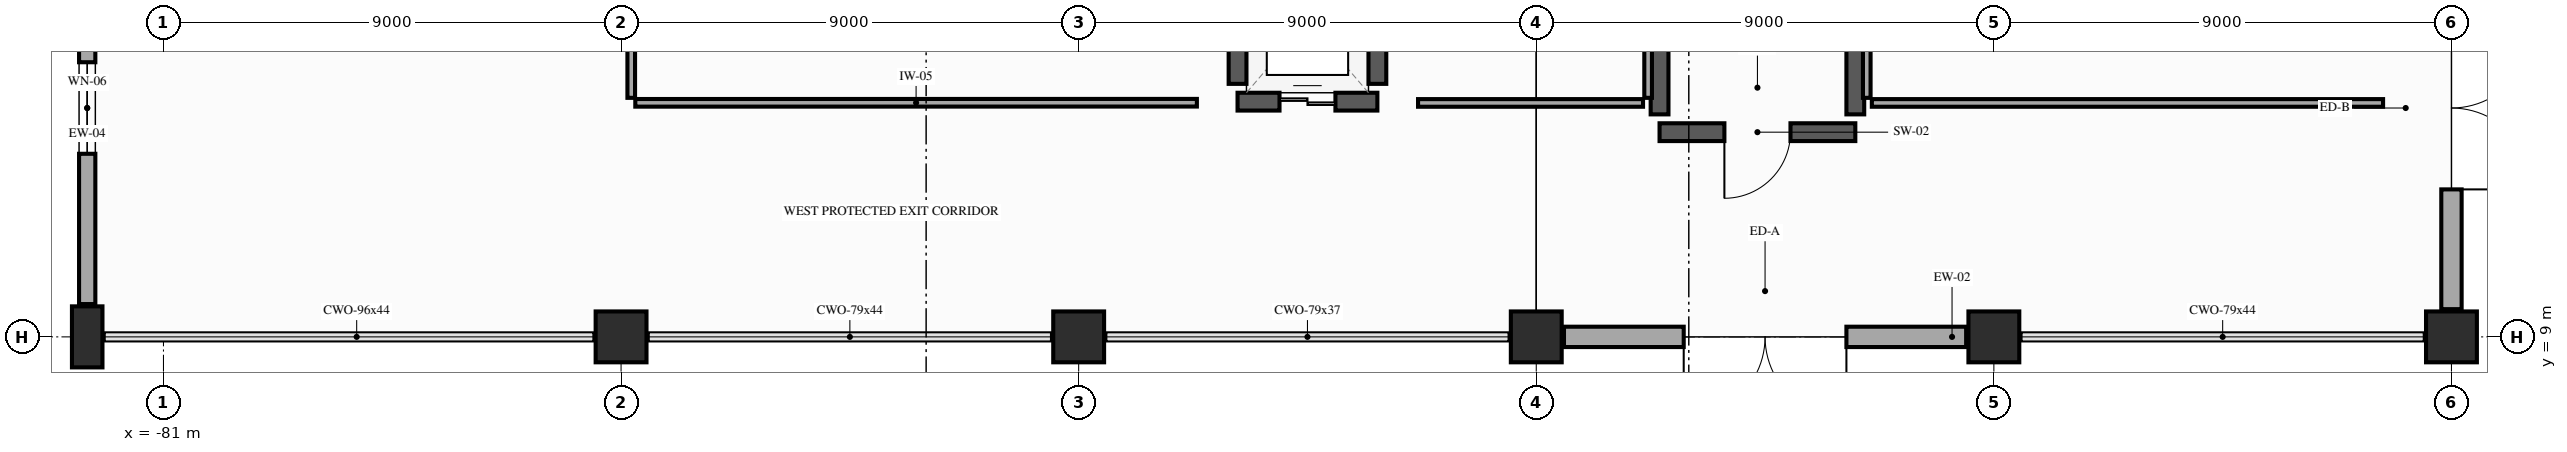
"""IFC4 building model, lengths in metres.
Left out: names, types, materials, properties, quantities, classifications, styles, units other than length and angle.
Written with IfcOpenShell. Run it as: python <this file> out.ifc"""

import sys

from ifc_helpers import new_model, si_unit, direction, frame, frame_2d, origin, origin_2d, place, context, subcontext, project, spatial, rectangle, extrude, element, fill, save


model = new_model("IFC4")
c1 = context("Model", 3, precision=1e-05, world=origin(), true_north=direction((0.0, 1.0)))
c2 = subcontext(c1, "Body", "Model", "MODEL_VIEW")
j1 = project(units=[si_unit("LENGTHUNIT", "METRE"), si_unit("PLANEANGLEUNIT", "RADIAN")], contexts=[c1])
p1 = place(None, origin())
s1 = spatial("IfcSite", under=j1, at=p1, CompositionType="ELEMENT")
p2 = place(p1, origin())
s2 = spatial("IfcBuilding", under=s1, at=p2, CompositionType="ELEMENT")
p3 = place(p2, origin())
s3 = spatial("IfcBuildingStorey", under=s2, at=p3, CompositionType="ELEMENT", Elevation=0.0)
p4 = place(p3, frame((-82.5, 9.0, 0.0), z_axis=(0.0, 0.0, 1.0), x_axis=(1.0, 0.0, 0.0)))
e1 = element("IfcColumn", 1, at=p4, inside=s3, PredefinedType="PILASTER", context=c2, shape_type="SweptSolid", body=[
    extrude(rectangle(XDim=0.6, YDim=1.2, at=origin_2d()), origin(), (0.0, 0.0, 1.0), 5.4),
])
for number, where, z_axis, x_axis in (
    (2, (-72.0, 9.0, 0.0), (0.0, 0.0, 1.0), (1.0, 0.0, 0.0)),
    (3, (-63.0, 9.0, 0.0), (0.0, 0.0, 1.0), (1.0, 0.0, 0.0)),
    (4, (-54.0, 9.0, 0.0), (0.0, 0.0, 1.0), (1.0, 0.0, 0.0)),
    (5, (-45.0, 9.0, 0.0), (0.0, 0.0, 1.0), (1.0, 0.0, 0.0)),
    (6, (-36.0, 9.0, 0.0), (0.0, 0.0, 1.0), (1.0, 0.0, 0.0)),
):
    element("IfcColumn", number, at=place(p3, frame(where, z_axis=z_axis, x_axis=x_axis)), inside=s3, PredefinedType="COLUMN", context=c2, shape_type="SweptSolid", body=[
        extrude(rectangle(XDim=1.0, YDim=1.0, at=origin_2d()), origin(), (0.0, 0.0, 1.0), 5.4),
    ])
p5 = place(p3, frame((-36.0, 17.455, 0.0), z_axis=(0.0, 0.0, 1.0), x_axis=(0.0, -1.0, 0.0)))
e7 = element("IfcWall", 7, at=p5, inside=s3, PredefinedType="SOLIDWALL", context=c2, shape_type="SweptSolid", body=[
    extrude(rectangle(XDim=7.91, YDim=0.4, at=frame_2d((3.955, 0.0))), origin(), (0.0, 0.0, 1.0), 4.405),
])
p6 = place(p5, frame((2.355, 0.0, 0.0)))
e8 = element("IfcOpeningElement", 8, at=p6, cuts=e7, PredefinedType="OPENING", context=c2, shape_type="SweptSolid", body=[
    extrude(rectangle(XDim=3.2, YDim=2.8, at=frame_2d((1.6, 1.4))), frame((0.0, 0.21, 0.0), z_axis=(0.0, -1.0, 0.0), x_axis=(1.0, 0.0, 0.0)), (0.0, 0.0, 1.0), 0.42),
])
p7 = place(p3, frame((-45.545, 9.0, 0.0), z_axis=(0.0, 0.0, 1.0), x_axis=(-1.0, 0.0, 0.0)))
e9 = element("IfcWall", 9, at=p7, inside=s3, PredefinedType="SOLIDWALL", context=c2, shape_type="SweptSolid", body=[
    extrude(rectangle(XDim=7.91, YDim=0.4, at=frame_2d((3.955, 0.0))), origin(), (0.0, 0.0, 1.0), 3.755),
])
p8 = place(p7, frame((2.355, 0.0, 0.0)))
e10 = element("IfcOpeningElement", 10, at=p8, cuts=e9, PredefinedType="OPENING", context=c2, shape_type="SweptSolid", body=[
    extrude(rectangle(XDim=3.2, YDim=3.0, at=frame_2d((1.6, 1.5))), frame((0.0, 0.21, 0.0), z_axis=(0.0, -1.0, 0.0), x_axis=(1.0, 0.0, 0.0)), (0.0, 0.0, 1.0), 0.42),
])
p9 = place(p3, frame((-82.5, 9.645, 0.0), z_axis=(0.0, 0.0, 1.0), x_axis=(0.0, 1.0, 0.0)))
e11 = element("IfcWall", 11, at=p9, inside=s3, PredefinedType="SOLIDWALL", context=c2, shape_type="SweptSolid", body=[
    extrude(rectangle(XDim=7.71, YDim=0.32, at=frame_2d((3.855, 0.0))), origin(), (0.0, 0.0, 1.0), 4.405),
])
p10 = place(p9, frame((2.955, 0.0, 0.9)))
e12 = element("IfcOpeningElement", 12, at=p10, cuts=e11, PredefinedType="OPENING", context=c2, shape_type="SweptSolid", body=[
    extrude(rectangle(XDim=1.8, YDim=2.2, at=frame_2d((0.9, 1.1))), frame((0.0, 0.17, 0.0), z_axis=(0.0, -1.0, 0.0), x_axis=(1.0, 0.0, 0.0)), (0.0, 0.0, 1.0), 0.34),
])
p11 = place(p3, frame((-47.725, 13.025, 0.0), z_axis=(0.0, 0.0, 1.0), x_axis=(-1.0, 0.0, 0.0)))
e13 = element("IfcWall", 13, at=p11, inside=s3, PredefinedType="SHEAR", context=c2, shape_type="SweptSolid", body=[
    extrude(rectangle(XDim=3.85, YDim=0.35, at=frame_2d((1.925, 0.0))), origin(), (0.0, 0.0, 1.0), 5.12),
])
p12 = place(p11, frame((1.275, 0.0, 0.0)))
e14 = element("IfcOpeningElement", 14, at=p12, cuts=e13, PredefinedType="OPENING", context=c2, shape_type="SweptSolid", body=[
    extrude(rectangle(XDim=1.3, YDim=2.2, at=frame_2d((0.65, 1.1))), frame((0.0, 0.185, 0.0), z_axis=(0.0, -1.0, 0.0), x_axis=(1.0, 0.0, 0.0)), (0.0, 0.0, 1.0), 0.37),
])
for number, where, z_axis, x_axis in (
    (15, (-51.575, 13.375, 0.0), (0.0, 0.0, 1.0), (0.0, 1.0, 0.0)),
    (16, (-47.725, 13.375, 0.0), (0.0, 0.0, 1.0), (0.0, 1.0, 0.0)),
):
    element("IfcWall", number, at=place(p3, frame(where, z_axis=z_axis, x_axis=x_axis)), inside=s3, PredefinedType="SHEAR", context=c2, shape_type="SweptSolid", body=[
        extrude(rectangle(XDim=9.1, YDim=0.35, at=frame_2d((4.55, 0.0))), origin(), (0.0, 0.0, 1.0), 5.12),
    ])
p13 = place(p3, frame((-59.875, 13.625, 0.0), z_axis=(0.0, 0.0, 1.0), x_axis=(1.0, 0.0, 0.0)))
e17 = element("IfcWall", 17, at=p13, inside=s3, PredefinedType="SHEAR", context=c2, shape_type="SweptSolid", body=[
    extrude(rectangle(XDim=2.75, YDim=0.35, at=frame_2d((1.375, 0.0))), origin(), (0.0, 0.0, 1.0), 5.12),
])
p14 = place(p13, frame((0.825, 0.0, 0.0)))
e18 = element("IfcOpeningElement", 18, at=p14, cuts=e17, PredefinedType="OPENING", context=c2, shape_type="SweptSolid", body=[
    extrude(rectangle(XDim=1.1, YDim=2.2, at=frame_2d((0.55, 1.1))), frame((0.0, 0.185, 0.0), z_axis=(0.0, -1.0, 0.0), x_axis=(1.0, 0.0, 0.0)), (0.0, 0.0, 1.0), 0.37),
])
for number, where, z_axis, x_axis in (
    (19, (-59.875, 13.975, 0.0), (0.0, 0.0, 1.0), (0.0, 1.0, 0.0)),
    (20, (-57.125, 13.975, 0.0), (0.0, 0.0, 1.0), (0.0, 1.0, 0.0)),
):
    element("IfcWall", number, at=place(p3, frame(where, z_axis=z_axis, x_axis=x_axis)), inside=s3, PredefinedType="SHEAR", context=c2, shape_type="SweptSolid", body=[
        extrude(rectangle(XDim=2.45, YDim=0.35, at=frame_2d((1.225, 0.0))), origin(), (0.0, 0.0, 1.0), 5.12),
    ])
p15 = place(p3, frame((-71.8, 17.36, 0.0), z_axis=(0.0, 0.0, 1.0), x_axis=(0.0, -1.0, 0.0)))
e21 = element("IfcWall", 21, at=p15, inside=s3, PredefinedType="PARTITIONING", context=c2, shape_type="SweptSolid", body=[
    extrude(rectangle(XDim=3.66, YDim=0.15, at=frame_2d((1.83, 0.0))), origin(), (0.0, 0.0, 1.0), 4.405),
])
p16 = place(p3, frame((-71.72, 13.602, 0.0), z_axis=(0.0, 0.0, 1.0), x_axis=(0.999999984365, 0.000176834657, 0.0)))
e22 = element("IfcWall", 22, at=p16, inside=s3, PredefinedType="PARTITIONING", context=c2, shape_type="SweptSolid", body=[
    extrude(rectangle(XDim=11.045, YDim=0.15, at=frame_2d((5.522, 0.0))), origin(), (0.0, 0.0, 1.0), 4.405),
])
p17 = place(p3, frame((-56.325, 13.6, 0.0), z_axis=(0.0, 0.0, 1.0), x_axis=(1.0, 0.0, 0.0)))
e23 = element("IfcWall", 23, at=p17, inside=s3, PredefinedType="PARTITIONING", context=c2, shape_type="SweptSolid", body=[
    extrude(rectangle(XDim=4.425, YDim=0.15, at=frame_2d((2.212, 0.0))), origin(), (0.0, 0.0, 1.0), 4.405),
])
p18 = place(p3, frame((-51.8, 13.7, 0.0), z_axis=(0.0, 0.0, 1.0), x_axis=(0.0, 1.0, 0.0)))
e24 = element("IfcWall", 24, at=p18, inside=s3, PredefinedType="PARTITIONING", context=c2, shape_type="SweptSolid", body=[
    extrude(rectangle(XDim=12.9, YDim=0.15, at=frame_2d((6.45, 0.0))), origin(), (0.0, 0.0, 1.0), 4.405),
])
p19 = place(p18, frame((9.42, 0.0, 0.0)))
e25 = element("IfcOpeningElement", 25, at=p19, cuts=e24, PredefinedType="OPENING", context=c2, shape_type="SweptSolid", body=[
    extrude(rectangle(XDim=1.8, YDim=2.3, at=frame_2d((0.9, 1.15))), frame((0.0, 0.085, 0.0), z_axis=(0.0, -1.0, 0.0), x_axis=(1.0, 0.0, 0.0)), (0.0, 0.0, 1.0), 0.17),
])
p20 = place(p3, frame((-47.498, 26.62, 0.0), z_axis=(0.0, 0.0, 1.0), x_axis=(-0.000151168721, -0.999999988574, 0.0)))
e26 = element("IfcWall", 26, at=p20, inside=s3, PredefinedType="PARTITIONING", context=c2, shape_type="SweptSolid", body=[
    extrude(rectangle(XDim=12.92, YDim=0.15, at=frame_2d((6.46, 0.0))), origin(), (0.0, 0.0, 1.0), 4.405),
])
p21 = place(p20, frame((1.684, 0.0, 0.0)))
e27 = element("IfcOpeningElement", 27, at=p21, cuts=e26, PredefinedType="OPENING", context=c2, shape_type="SweptSolid", body=[
    extrude(rectangle(XDim=1.8, YDim=2.3, at=frame_2d((0.9, 1.15))), frame((0.0, 0.085, 0.0), z_axis=(0.0, -1.0, 0.0), x_axis=(1.0, 0.0, 0.0)), (0.0, 0.0, 1.0), 0.17),
])
p22 = place(p3, frame((-47.4, 13.6, 0.0), z_axis=(0.0, 0.0, 1.0), x_axis=(1.0, 0.0, 0.0)))
e28 = element("IfcWall", 28, at=p22, inside=s3, PredefinedType="PARTITIONING", context=c2, shape_type="SweptSolid", body=[
    extrude(rectangle(XDim=10.055, YDim=0.15, at=frame_2d((5.027, 0.0))), origin(), (0.0, 0.0, 1.0), 4.405),
])
p23 = place(p6, origin())
e29 = element("IfcDoor", 29, at=p23, inside=s3, OperationType="DOUBLE_DOOR_SINGLE_SWING", PredefinedType="DOOR", context=c2, shape_type="SweptSolid", body=[
    extrude(rectangle(XDim=3.2, YDim=2.8, at=frame_2d((1.6, 1.4))), frame((0.0, 0.025, 0.0), z_axis=(0.0, -1.0, 0.0), x_axis=(1.0, 0.0, 0.0)), (0.0, 0.0, 1.0), 0.05),
])
fill(e8, e29)
p24 = place(p8, origin())
e30 = element("IfcDoor", 30, at=p24, inside=s3, OperationType="DOUBLE_DOOR_SINGLE_SWING", PredefinedType="DOOR", context=c2, shape_type="SweptSolid", body=[
    extrude(rectangle(XDim=3.2, YDim=3.0, at=frame_2d((1.6, 1.5))), frame((0.0, 0.025, 0.0), z_axis=(0.0, -1.0, 0.0), x_axis=(1.0, 0.0, 0.0)), (0.0, 0.0, 1.0), 0.05),
])
fill(e10, e30)
p25 = place(p10, origin())
e31 = element("IfcWindow", 31, at=p25, inside=s3, PartitioningType="SINGLE_PANEL", PredefinedType="WINDOW", context=c2, shape_type="SweptSolid", body=[
    extrude(rectangle(XDim=1.8, YDim=2.2, at=frame_2d((0.9, 1.1))), frame((0.0, 0.03, 0.0), z_axis=(0.0, -1.0, 0.0), x_axis=(1.0, 0.0, 0.0)), (0.0, 0.0, 1.0), 0.06),
])
fill(e12, e31)
p26 = place(p12, origin())
e32 = element("IfcDoor", 32, at=p26, inside=s3, OperationType="SINGLE_SWING_RIGHT", PredefinedType="DOOR", context=c2, shape_type="SweptSolid", body=[
    extrude(rectangle(XDim=1.3, YDim=2.2, at=frame_2d((0.65, 1.1))), frame((0.0, 0.025, 0.0), z_axis=(0.0, -1.0, 0.0), x_axis=(1.0, 0.0, 0.0)), (0.0, 0.0, 1.0), 0.05),
])
fill(e14, e32)
p27 = place(p14, origin())
e33 = element("IfcDoor", 33, at=p27, inside=s3, OperationType="DOUBLE_DOOR_SLIDING", PredefinedType="DOOR", context=c2, shape_type="SweptSolid", body=[
    extrude(rectangle(XDim=1.1, YDim=2.2, at=frame_2d((0.55, 1.1))), frame((0.0, 0.025, 0.0), z_axis=(0.0, -1.0, 0.0), x_axis=(1.0, 0.0, 0.0)), (0.0, 0.0, 1.0), 0.05),
])
fill(e18, e33)
save(model, sys.argv[1])
